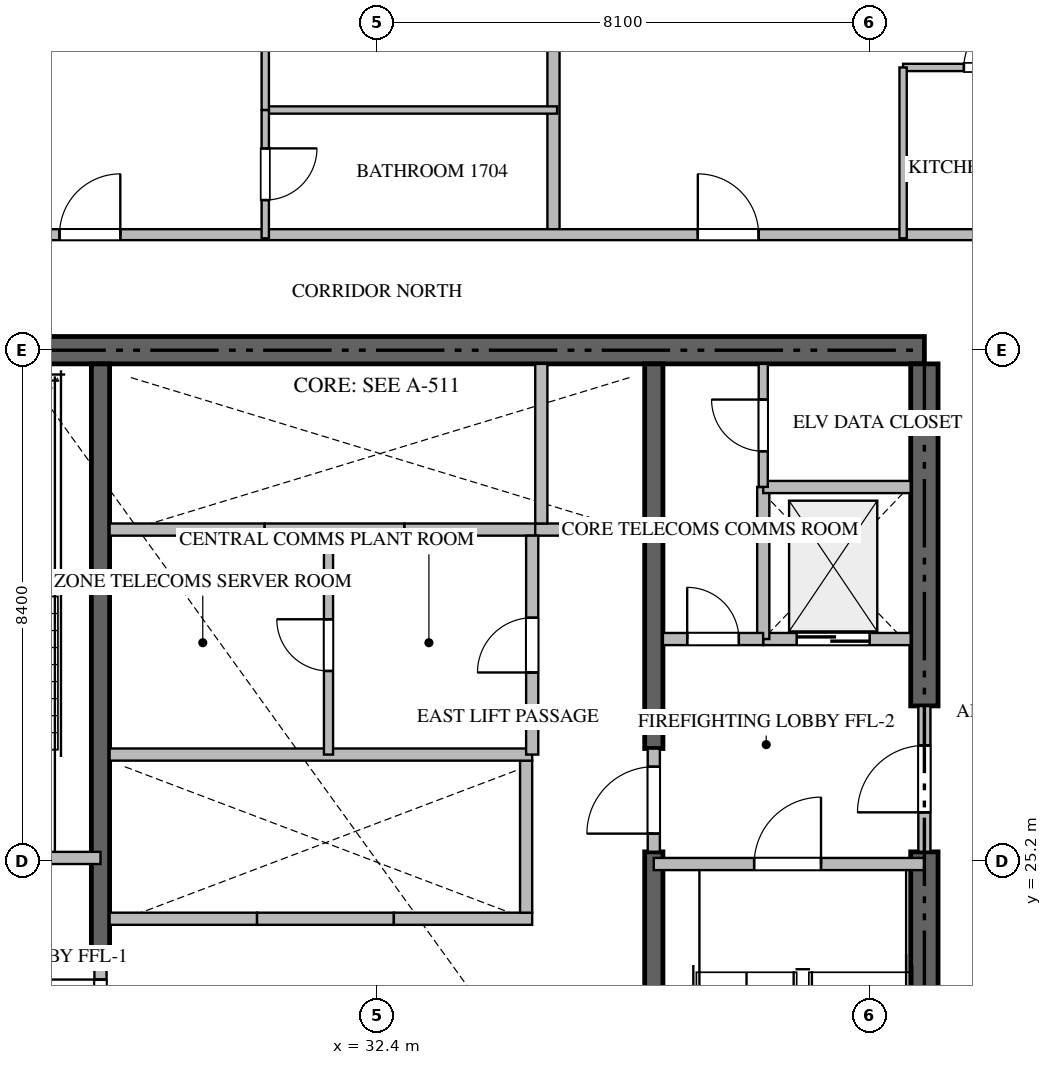
"""IFC4 building model, lengths in metres.
Left out: names, types, materials, properties, quantities, classifications, styles, units other than length and angle.
Written with IfcOpenShell. Run it as: python <this file> out.ifc"""

import sys

from ifc_helpers import new_model, si_unit, direction, frame, frame_2d, origin, place, context, subcontext, project, spatial, rectangle, extrude, source, transform, mapped, element, fill, save


model = new_model("IFC4")
c1 = context("Model", 3, precision=1e-05, world=origin(), true_north=direction((0.0, 1.0)))
c2 = subcontext(c1, "Body", "Model", "MODEL_VIEW")
j1 = project(units=[si_unit("LENGTHUNIT", "METRE"), si_unit("PLANEANGLEUNIT", "RADIAN")], contexts=[c1])
p1 = place(None, origin())
s1 = spatial("IfcSite", under=j1, at=p1, CompositionType="ELEMENT")
p2 = place(p1, origin())
s2 = spatial("IfcBuilding", under=s1, at=p2, CompositionType="ELEMENT")
p3 = place(p2, frame((0.0, 0.0, 71.7)))
s3 = spatial("IfcBuildingStorey", under=s2, at=p3, CompositionType="ELEMENT", Elevation=71.7)
p4 = place(p3, frame((41.4, 33.6, -0.26), z_axis=(0.0, 0.0, 1.0), x_axis=(-1.0, 0.0, 0.0)))
e1 = element("IfcWall", 1, at=p4, inside=s3, PredefinedType="SHEAR", context=c2, shape_type="SweptSolid", body=[
    extrude(rectangle(XDim=18.0, YDim=0.45, at=frame_2d((9.0, 0.0))), origin(), (0.0, 0.0, 1.0), 3.748),
])
p5 = place(p3, frame((41.4, 17.025, -0.26), z_axis=(0.0, 0.0, 1.0), x_axis=(0.0, 1.0, 0.0)))
e2 = element("IfcWall", 2, at=p5, inside=s3, PredefinedType="SHEAR", context=c2, shape_type="SweptSolid", body=[
    extrude(rectangle(XDim=8.325, YDim=0.45, at=frame_2d((4.163, 0.0))), origin(), (0.0, 0.0, 1.0), 3.748),
])
p6 = place(p3, frame((41.4, 27.75, -0.26), z_axis=(0.0, 0.0, 1.0), x_axis=(0.0, 1.0, 0.0)))
e3 = element("IfcWall", 3, at=p6, inside=s3, PredefinedType="SHEAR", context=c2, shape_type="SweptSolid", body=[
    extrude(rectangle(XDim=5.625, YDim=0.45, at=frame_2d((2.812, 0.0))), origin(), (0.0, 0.0, 1.0), 3.748),
])
p7 = place(p3, frame((27.85, 23.55, -0.26), z_axis=(0.0, 0.0, 1.0), x_axis=(0.0, 1.0, 0.0)))
e4 = element("IfcWall", 4, at=p7, inside=s3, PredefinedType="SHEAR", context=c2, shape_type="SweptSolid", body=[
    extrude(rectangle(XDim=9.825, YDim=0.3, at=frame_2d((4.913, 0.0))), origin(), (0.0, 0.0, 1.0), 3.748),
])
p8 = place(p3, frame((36.95, 17.025, -0.26), z_axis=(0.0, 0.0, 1.0), x_axis=(0.0, 1.0, 0.0)))
e5 = element("IfcWall", 5, at=p8, inside=s3, PredefinedType="SHEAR", context=c2, shape_type="SweptSolid", body=[
    extrude(rectangle(XDim=8.325, YDim=0.3, at=frame_2d((4.163, 0.0))), origin(), (0.0, 0.0, 1.0), 3.748),
])
p9 = place(p3, frame((36.95, 27.05, -0.26), z_axis=(0.0, 0.0, 1.0), x_axis=(0.0, 1.0, 0.0)))
e6 = element("IfcWall", 6, at=p9, inside=s3, PredefinedType="SHEAR", context=c2, shape_type="SweptSolid", body=[
    extrude(rectangle(XDim=6.325, YDim=0.3, at=frame_2d((3.163, 0.0))), origin(), (0.0, 0.0, 1.0), 3.748),
])
p10 = place(p3, frame((23.4, 25.25, 0.0), z_axis=(0.0, 0.0, 1.0), x_axis=(1.0, 0.0, 0.0)))
e7 = element("IfcWall", 7, at=p10, inside=s3, PredefinedType="STANDARD", context=c2, shape_type="SweptSolid", body=[
    extrude(rectangle(XDim=4.45, YDim=0.2, at=frame_2d((2.225, 0.0))), origin(), (0.0, 0.0, 1.0), 3.49),
])
p11 = place(p10, frame((1.65, 0.0, 0.0)))
e8 = element("IfcOpeningElement", 8, at=p11, cuts=e7, PredefinedType="OPENING", context=c2, shape_type="SweptSolid", body=[
    extrude(rectangle(XDim=1.1, YDim=2.15, at=frame_2d((0.55, 1.075))), frame((0.0, 0.11, 0.0), z_axis=(0.0, -1.0, 0.0), x_axis=(1.0, 0.0, 0.0)), (0.0, 0.0, 1.0), 0.22),
])
p12 = place(p3, frame((36.95, 25.15, 0.0), z_axis=(0.0, 0.0, 1.0), x_axis=(1.0, 0.0, 0.0)))
e9 = element("IfcWall", 9, at=p12, inside=s3, PredefinedType="STANDARD", context=c2, shape_type="SweptSolid", body=[
    extrude(rectangle(XDim=4.45, YDim=0.2, at=frame_2d((2.225, 0.0))), origin(), (0.0, 0.0, 1.0), 3.49),
])
p13 = place(p12, frame((1.65, 0.0, 0.0)))
e10 = element("IfcOpeningElement", 10, at=p13, cuts=e9, PredefinedType="OPENING", context=c2, shape_type="SweptSolid", body=[
    extrude(rectangle(XDim=1.1, YDim=2.15, at=frame_2d((0.55, 1.075))), frame((0.0, 0.11, 0.0), z_axis=(0.0, -1.0, 0.0), x_axis=(1.0, 0.0, 0.0)), (0.0, 0.0, 1.0), 0.22),
])
p14 = place(p3, frame((38.75, 28.85, 0.0), z_axis=(0.0, 0.0, 1.0), x_axis=(1.0, 0.0, 0.0)))
e11 = element("IfcWall", 11, at=p14, inside=s3, PredefinedType="STANDARD", context=c2, shape_type="SweptSolid", body=[
    extrude(rectangle(XDim=2.425, YDim=0.2, at=frame_2d((1.212, 0.0))), origin(), (0.0, 0.0, 1.0), 3.49),
])
p15 = place(p14, frame((0.55, 0.0, 0.0)))
e12 = element("IfcOpeningElement", 12, at=p15, cuts=e11, PredefinedType="OPENING", context=c2, shape_type="SweptSolid", body=[
    extrude(rectangle(XDim=1.2, YDim=2.2, at=frame_2d((0.6, 1.1))), frame((0.0, 0.11, 0.0), z_axis=(0.0, -1.0, 0.0), x_axis=(1.0, 0.0, 0.0)), (0.0, 0.0, 1.0), 0.22),
])
p16 = place(p3, frame((28.0, 24.25, 0.0), z_axis=(0.0, 0.0, 1.0), x_axis=(1.0, 0.0, 0.0)))
e13 = element("IfcWall", 13, at=p16, inside=s3, PredefinedType="STANDARD", context=c2, shape_type="SweptSolid", body=[
    extrude(rectangle(XDim=2.425, YDim=0.2, at=frame_2d((1.212, 0.0))), origin(), (0.0, 0.0, 1.0), 3.49),
])
p17 = place(p3, frame((30.425, 24.25, 0.0), z_axis=(0.0, 0.0, 1.0), x_axis=(1.0, 0.0, 0.0)))
e14 = element("IfcWall", 14, at=p17, inside=s3, PredefinedType="STANDARD", context=c2, shape_type="SweptSolid", body=[
    extrude(rectangle(XDim=2.25, YDim=0.2, at=frame_2d((1.125, 0.0))), origin(), (0.0, 0.0, 1.0), 3.49),
])
p18 = place(p3, frame((32.675, 24.25, 0.0), z_axis=(0.0, 0.0, 1.0), x_axis=(1.0, 0.0, 0.0)))
e15 = element("IfcWall", 15, at=p18, inside=s3, PredefinedType="STANDARD", context=c2, shape_type="SweptSolid", body=[
    extrude(rectangle(XDim=2.275, YDim=0.2, at=frame_2d((1.137, 0.0))), origin(), (0.0, 0.0, 1.0), 3.49),
])
p19 = place(p3, frame((34.85, 24.35, 0.0), z_axis=(0.0, 0.0, 1.0), x_axis=(0.0, 1.0, 0.0)))
e16 = element("IfcWall", 16, at=p19, inside=s3, PredefinedType="STANDARD", context=c2, shape_type="SweptSolid", body=[
    extrude(rectangle(XDim=2.5, YDim=0.2, at=frame_2d((1.25, 0.0))), origin(), (0.0, 0.0, 1.0), 3.49),
])
p20 = place(p3, frame((28.0, 30.65, 0.0), z_axis=(0.0, 0.0, 1.0), x_axis=(1.0, 0.0, 0.0)))
e17 = element("IfcWall", 17, at=p20, inside=s3, PredefinedType="STANDARD", context=c2, shape_type="SweptSolid", body=[
    extrude(rectangle(XDim=2.55, YDim=0.2, at=frame_2d((1.275, 0.0))), origin(), (0.0, 0.0, 1.0), 3.49),
])
p21 = place(p3, frame((30.55, 30.65, 0.0), z_axis=(0.0, 0.0, 1.0), x_axis=(1.0, 0.0, 0.0)))
e18 = element("IfcWall", 18, at=p21, inside=s3, PredefinedType="STANDARD", context=c2, shape_type="SweptSolid", body=[
    extrude(rectangle(XDim=2.3, YDim=0.2, at=frame_2d((1.15, 0.0))), origin(), (0.0, 0.0, 1.0), 3.49),
])
p22 = place(p3, frame((32.85, 30.65, 0.0), z_axis=(0.0, 0.0, 1.0), x_axis=(1.0, 0.0, 0.0)))
e19 = element("IfcWall", 19, at=p22, inside=s3, PredefinedType="STANDARD", context=c2, shape_type="SweptSolid", body=[
    extrude(rectangle(XDim=2.15, YDim=0.2, at=frame_2d((1.075, 0.0))), origin(), (0.0, 0.0, 1.0), 3.49),
])
p23 = place(p3, frame((35.0, 30.65, 0.0), z_axis=(0.0, 0.0, 1.0), x_axis=(1.0, 0.0, 0.0)))
e20 = element("IfcWall", 20, at=p23, inside=s3, PredefinedType="STANDARD", context=c2, shape_type="SweptSolid", body=[
    extrude(rectangle(XDim=1.8, YDim=0.2, at=frame_2d((0.9, 0.0))), origin(), (0.0, 0.0, 1.0), 3.49),
])
p24 = place(p3, frame((35.1, 30.75, 0.0), z_axis=(0.0, 0.0, 1.0), x_axis=(0.0, 1.0, 0.0)))
e21 = element("IfcWall", 21, at=p24, inside=s3, PredefinedType="STANDARD", context=c2, shape_type="SweptSolid", body=[
    extrude(rectangle(XDim=2.625, YDim=0.2, at=frame_2d((1.312, 0.0))), origin(), (0.0, 0.0, 1.0), 3.49),
])
p25 = place(p3, frame((38.75, 28.85, 0.0), z_axis=(0.0, 0.0, 1.0), x_axis=(0.0, 1.0, 0.0)))
e22 = element("IfcWall", 22, at=p25, inside=s3, PredefinedType="STANDARD", context=c2, shape_type="SweptSolid", body=[
    extrude(rectangle(XDim=2.5, YDim=0.2, at=frame_2d((1.25, 0.0))), origin(), (0.0, 0.0, 1.0), 3.49),
])
p26 = place(p3, frame((38.75, 31.35, 0.0), z_axis=(0.0, 0.0, 1.0), x_axis=(1.0, 0.0, 0.0)))
e23 = element("IfcWall", 23, at=p26, inside=s3, PredefinedType="STANDARD", context=c2, shape_type="SweptSolid", body=[
    extrude(rectangle(XDim=2.425, YDim=0.2, at=frame_2d((1.212, 0.0))), origin(), (0.0, 0.0, 1.0), 3.49),
])
p27 = place(p3, frame((37.1, 28.85, 0.0), z_axis=(0.0, 0.0, 1.0), x_axis=(1.0, 0.0, 0.0)))
e24 = element("IfcWall", 24, at=p27, inside=s3, PredefinedType="STANDARD", context=c2, shape_type="SweptSolid", body=[
    extrude(rectangle(XDim=1.648, YDim=0.2, at=frame_2d((0.824, 0.0))), origin(), (0.0, 0.0, 1.0), 3.49),
])
p28 = place(p27, frame((0.399, 0.0, 0.0)))
e25 = element("IfcOpeningElement", 25, at=p28, cuts=e24, PredefinedType="OPENING", context=c2, shape_type="SweptSolid", body=[
    extrude(rectangle(XDim=0.85, YDim=2.1, at=frame_2d((0.425, 1.05))), frame((0.0, 0.11, 0.0), z_axis=(0.0, -1.0, 0.0), x_axis=(1.0, 0.0, 0.0)), (0.0, 0.0, 1.0), 0.22),
])
p29 = place(p3, frame((41.4, 25.352, 0.0), z_axis=(0.0, 0.0, 1.0), x_axis=(0.0, 1.0, 0.0)))
e26 = element("IfcWall", 26, at=p29, inside=s3, PredefinedType="STANDARD", context=c2, shape_type="SweptSolid", body=[
    extrude(rectangle(XDim=2.396, YDim=0.2, at=frame_2d((1.198, 0.0))), origin(), (0.0, 0.0, 1.0), 3.49),
])
p30 = place(p29, frame((0.648, 0.0, 0.0)))
e27 = element("IfcOpeningElement", 27, at=p30, cuts=e26, PredefinedType="OPENING", context=c2, shape_type="SweptSolid", body=[
    extrude(rectangle(XDim=1.1, YDim=2.15, at=frame_2d((0.55, 1.075))), frame((0.0, 0.11, 0.0), z_axis=(0.0, -1.0, 0.0), x_axis=(1.0, 0.0, 0.0)), (0.0, 0.0, 1.0), 0.22),
])
p31 = place(p3, frame((27.85, 21.852, 0.0), z_axis=(0.0, 0.0, 1.0), x_axis=(0.0, 1.0, 0.0)))
e28 = element("IfcWall", 28, at=p31, inside=s3, PredefinedType="STANDARD", context=c2, shape_type="SweptSolid", body=[
    extrude(rectangle(XDim=1.696, YDim=0.2, at=frame_2d((0.848, 0.0))), origin(), (0.0, 0.0, 1.0), 3.49),
])
p32 = place(p31, frame((0.298, 0.0, 0.0)))
e29 = element("IfcOpeningElement", 29, at=p32, cuts=e28, PredefinedType="OPENING", context=c2, shape_type="SweptSolid", body=[
    extrude(rectangle(XDim=1.1, YDim=2.15, at=frame_2d((0.55, 1.075))), frame((0.0, 0.11, 0.0), z_axis=(0.0, -1.0, 0.0), x_axis=(1.0, 0.0, 0.0)), (0.0, 0.0, 1.0), 0.22),
])
p33 = place(p3, frame((36.95, 25.352, 0.0), z_axis=(0.0, 0.0, 1.0), x_axis=(0.0, 1.0, 0.0)))
e30 = element("IfcWall", 30, at=p33, inside=s3, PredefinedType="STANDARD", context=c2, shape_type="SweptSolid", body=[
    extrude(rectangle(XDim=1.696, YDim=0.2, at=frame_2d((0.848, 0.0))), origin(), (0.0, 0.0, 1.0), 3.49),
])
p34 = place(p33, frame((0.298, 0.0, 0.0)))
e31 = element("IfcOpeningElement", 31, at=p34, cuts=e30, PredefinedType="OPENING", context=c2, shape_type="SweptSolid", body=[
    extrude(rectangle(XDim=1.1, YDim=2.15, at=frame_2d((0.55, 1.075))), frame((0.0, 0.11, 0.0), z_axis=(0.0, -1.0, 0.0), x_axis=(1.0, 0.0, 0.0)), (0.0, 0.0, 1.0), 0.22),
])
p35 = place(p3, frame((28.0, 26.95, 0.0), z_axis=(0.0, 0.0, 1.0), x_axis=(1.0, 0.0, 0.0)))
e32 = element("IfcWall", 32, at=p35, inside=s3, PredefinedType="STANDARD", context=c2, shape_type="SweptSolid", body=[
    extrude(rectangle(XDim=6.95, YDim=0.2, at=frame_2d((3.475, 0.0))), origin(), (0.0, 0.0, 1.0), 3.49),
])
p36 = place(p3, frame((38.75, 31.352, 0.0), z_axis=(0.0, 0.0, 1.0), x_axis=(0.0, 1.0, 0.0)))
e33 = element("IfcWall", 33, at=p36, inside=s3, PredefinedType="PARTITIONING", context=c2, shape_type="SweptSolid", body=[
    extrude(rectangle(XDim=2.023, YDim=0.15, at=frame_2d((1.011, 0.0))), origin(), (0.0, 0.0, 1.0), 3.49),
])
p37 = place(p36, frame((0.586, 0.0, 0.0)))
e34 = element("IfcOpeningElement", 34, at=p37, cuts=e33, PredefinedType="OPENING", context=c2, shape_type="SweptSolid", body=[
    extrude(rectangle(XDim=0.85, YDim=2.1, at=frame_2d((0.425, 1.05))), frame((0.0, 0.085, 0.0), z_axis=(0.0, -1.0, 0.0), x_axis=(1.0, 0.0, 0.0)), (0.0, 0.0, 1.0), 0.17),
])
p38 = place(p3, frame((34.95, 26.95, 0.0), z_axis=(0.0, 0.0, 1.0), x_axis=(0.0, 1.0, 0.0)))
e35 = element("IfcWall", 35, at=p38, inside=s3, PredefinedType="STANDARD", context=c2, shape_type="SweptSolid", body=[
    extrude(rectangle(XDim=3.6, YDim=0.2, at=frame_2d((1.8, 0.0))), origin(), (0.0, 0.0, 1.0), 3.49),
])
p39 = place(p38, frame((1.35, 0.0, 0.0)))
e36 = element("IfcOpeningElement", 36, at=p39, cuts=e35, PredefinedType="OPENING", context=c2, shape_type="SweptSolid", body=[
    extrude(rectangle(XDim=0.9, YDim=2.1, at=frame_2d((0.45, 1.05))), frame((0.0, 0.11, 0.0), z_axis=(0.0, -1.0, 0.0), x_axis=(1.0, 0.0, 0.0)), (0.0, 0.0, 1.0), 0.22),
])
p40 = place(p3, frame((31.6, 26.95, 0.0), z_axis=(0.0, 0.0, 1.0), x_axis=(0.0, 1.0, 0.0)))
e37 = element("IfcWall", 37, at=p40, inside=s3, PredefinedType="PARTITIONING", context=c2, shape_type="SweptSolid", body=[
    extrude(rectangle(XDim=3.6, YDim=0.15, at=frame_2d((1.8, 0.0))), origin(), (0.0, 0.0, 1.0), 3.49),
])
p41 = place(p40, frame((1.375, 0.0, 0.0)))
e38 = element("IfcOpeningElement", 38, at=p41, cuts=e37, PredefinedType="OPENING", context=c2, shape_type="SweptSolid", body=[
    extrude(rectangle(XDim=0.85, YDim=2.1, at=frame_2d((0.425, 1.05))), frame((0.0, 0.085, 0.0), z_axis=(0.0, -1.0, 0.0), x_axis=(1.0, 0.0, 0.0)), (0.0, 0.0, 1.0), 0.17),
])
p42 = place(p3, frame((35.3, 35.5, 0.0), z_axis=(0.0, 0.0, 1.0), x_axis=(0.0, 1.0, 0.0)))
e39 = element("IfcWall", 39, at=p42, inside=s3, PredefinedType="PARTITIONING", context=c2, shape_type="SweptSolid", body=[
    extrude(rectangle(XDim=14.618, YDim=0.2, at=frame_2d((7.309, 0.0))), origin(), (0.0, 0.0, 1.0), 3.49),
])
p43 = place(p3, frame((21.402, 35.5, 0.0), z_axis=(0.0, 0.0, 1.0), x_axis=(1.0, 0.0, 0.0)))
e40 = element("IfcWall", 40, at=p43, inside=s3, PredefinedType="PARTITIONING", context=c2, shape_type="SweptSolid", body=[
    extrude(rectangle(XDim=21.996, YDim=0.18, at=frame_2d((10.998, 0.0))), origin(), (0.0, 0.0, 1.0), 3.49),
])
p44 = place(p43, frame((5.774, 0.0, 0.0)))
e41 = element("IfcOpeningElement", 41, at=p44, cuts=e40, PredefinedType="OPENING", context=c2, shape_type="SweptSolid", body=[
    extrude(rectangle(XDim=1.0, YDim=2.15, at=frame_2d((0.5, 1.075))), frame((0.0, 0.1, 0.0), z_axis=(0.0, -1.0, 0.0), x_axis=(1.0, 0.0, 0.0)), (0.0, 0.0, 1.0), 0.2),
])
p45 = place(p43, frame((16.272, 0.0, 0.0)))
e42 = element("IfcOpeningElement", 42, at=p45, cuts=e40, PredefinedType="OPENING", context=c2, shape_type="SweptSolid", body=[
    extrude(rectangle(XDim=1.0, YDim=2.15, at=frame_2d((0.5, 1.075))), frame((0.0, 0.1, 0.0), z_axis=(0.0, -1.0, 0.0), x_axis=(1.0, 0.0, 0.0)), (0.0, 0.0, 1.0), 0.2),
])
p46 = place(p3, frame((30.56, 37.55, 0.0), z_axis=(0.0, 0.0, 1.0), x_axis=(1.0, 0.0, 0.0)))
e43 = element("IfcWall", 43, at=p46, inside=s3, PredefinedType="PARTITIONING", context=c2, shape_type="SweptSolid", body=[
    extrude(rectangle(XDim=4.8, YDim=0.12, at=frame_2d((2.4, 0.0))), origin(), (0.0, 0.0, 1.0), 3.49),
])
p47 = place(p3, frame((30.56, 43.706, 0.0), z_axis=(0.0, 0.0, 1.0), x_axis=(0.0, -1.0, 0.0)))
e44 = element("IfcWall", 44, at=p47, inside=s3, PredefinedType="PARTITIONING", context=c2, shape_type="SweptSolid", body=[
    extrude(rectangle(XDim=6.156, YDim=0.12, at=frame_2d((3.078, 0.0))), origin(), (0.0, 0.0, 1.0), 3.49),
])
p48 = place(p47, frame((2.653, 0.0, 0.0)))
e45 = element("IfcOpeningElement", 45, at=p48, cuts=e44, PredefinedType="OPENING", context=c2, shape_type="SweptSolid", body=[
    extrude(rectangle(XDim=0.85, YDim=2.1, at=frame_2d((0.425, 1.05))), frame((0.0, 0.07, 0.0), z_axis=(0.0, -1.0, 0.0), x_axis=(1.0, 0.0, 0.0)), (0.0, 0.0, 1.0), 0.14),
])
p49 = place(p3, frame((30.56, 37.548, 0.0), z_axis=(0.0, 0.0, 1.0), x_axis=(0.0, -1.0, 0.0)))
e46 = element("IfcWall", 46, at=p49, inside=s3, PredefinedType="PARTITIONING", context=c2, shape_type="SweptSolid", body=[
    extrude(rectangle(XDim=2.108, YDim=0.12, at=frame_2d((1.054, 0.0))), origin(), (0.0, 0.0, 1.0), 3.49),
])
p50 = place(p49, frame((0.629, 0.0, 0.0)))
e47 = element("IfcOpeningElement", 47, at=p50, cuts=e46, PredefinedType="OPENING", context=c2, shape_type="SweptSolid", body=[
    extrude(rectangle(XDim=0.85, YDim=2.1, at=frame_2d((0.425, 1.05))), frame((0.0, 0.07, 0.0), z_axis=(0.0, -1.0, 0.0), x_axis=(1.0, 0.0, 0.0)), (0.0, 0.0, 1.0), 0.14),
])
p51 = place(p3, frame((41.05, 38.25, 0.0), z_axis=(0.0, 0.0, 1.0), x_axis=(1.0, 0.0, 0.0)))
e48 = element("IfcWall", 48, at=p51, inside=s3, PredefinedType="PARTITIONING", context=c2, shape_type="SweptSolid", body=[
    extrude(rectangle(XDim=2.85, YDim=0.12, at=frame_2d((1.425, 0.0))), origin(), (0.0, 0.0, 1.0), 3.49),
])
p52 = place(p51, frame((1.0, 0.0, 0.0)))
e49 = element("IfcOpeningElement", 49, at=p52, cuts=e48, PredefinedType="OPENING", context=c2, shape_type="SweptSolid", body=[
    extrude(rectangle(XDim=0.85, YDim=2.1, at=frame_2d((0.425, 1.05))), frame((0.0, 0.07, 0.0), z_axis=(0.0, -1.0, 0.0), x_axis=(1.0, 0.0, 0.0)), (0.0, 0.0, 1.0), 0.14),
])
p53 = place(p3, frame((41.05, 38.25, 0.0), z_axis=(0.0, 0.0, 1.0), x_axis=(0.0, -1.0, 0.0)))
e50 = element("IfcWall", 50, at=p53, inside=s3, PredefinedType="PARTITIONING", context=c2, shape_type="SweptSolid", body=[
    extrude(rectangle(XDim=2.81, YDim=0.12, at=frame_2d((1.405, 0.0))), origin(), (0.0, 0.0, 1.0), 3.49),
])
m1 = source(origin(), c2, "Body", "SweptSolid", [
    extrude(rectangle(XDim=1.1, YDim=2.15, at=frame_2d((0.55, 1.075))), frame((0.0, 0.025, 0.0), z_axis=(0.0, -1.0, 0.0), x_axis=(1.0, 0.0, 0.0)), (0.0, 0.0, 1.0), 0.05),
])
p54 = place(p13, origin())
e51 = element("IfcDoor", 51, at=p54, inside=s3, OperationType="SINGLE_SWING_RIGHT", PredefinedType="DOOR", context=c2, shape_type="MappedRepresentation", body=[
    mapped(m1, transform((0.0, 0.0, 0.0), scale=1.0)),
])
fill(e10, e51)
m2 = source(origin(), c2, "Body", "SweptSolid", [
    extrude(rectangle(XDim=1.2, YDim=2.2, at=frame_2d((0.6, 1.1))), frame((0.0, 0.025, 0.0), z_axis=(0.0, -1.0, 0.0), x_axis=(1.0, 0.0, 0.0)), (0.0, 0.0, 1.0), 0.05),
])
p55 = place(p15, origin())
e52 = element("IfcDoor", 52, at=p55, inside=s3, OperationType="DOUBLE_DOOR_SLIDING", PredefinedType="DOOR", context=c2, shape_type="MappedRepresentation", body=[
    mapped(m2, transform((0.0, 0.0, 0.0), scale=1.0)),
])
fill(e12, e52)
m3 = source(origin(), c2, "Body", "SweptSolid", [
    extrude(rectangle(XDim=0.85, YDim=2.1, at=frame_2d((0.425, 1.05))), frame((0.0, 0.025, 0.0), z_axis=(0.0, -1.0, 0.0), x_axis=(1.0, 0.0, 0.0)), (0.0, 0.0, 1.0), 0.05),
])
p56 = place(p28, origin())
e53 = element("IfcDoor", 53, at=p56, inside=s3, OperationType="SINGLE_SWING_LEFT", PredefinedType="DOOR", context=c2, shape_type="MappedRepresentation", body=[
    mapped(m3, transform((0.0, 0.0, 0.0), scale=1.0)),
])
fill(e25, e53)
p57 = place(p30, origin())
e54 = element("IfcDoor", 54, at=p57, inside=s3, OperationType="SINGLE_SWING_LEFT", PredefinedType="DOOR", context=c2, shape_type="MappedRepresentation", body=[
    mapped(m1, transform((0.0, 0.0, 0.0), scale=1.0)),
])
fill(e27, e54)
p58 = place(p32, origin())
e55 = element("IfcDoor", 55, at=p58, inside=s3, OperationType="SINGLE_SWING_RIGHT", PredefinedType="DOOR", context=c2, shape_type="MappedRepresentation", body=[
    mapped(m1, transform((0.0, 0.0, 0.0), scale=1.0)),
])
fill(e29, e55)
p59 = place(p34, origin())
e56 = element("IfcDoor", 56, at=p59, inside=s3, OperationType="SINGLE_SWING_LEFT", PredefinedType="DOOR", context=c2, shape_type="MappedRepresentation", body=[
    mapped(m1, transform((0.0, 0.0, 0.0), scale=1.0)),
])
fill(e31, e56)
p60 = place(p37, origin())
e57 = element("IfcDoor", 57, at=p60, inside=s3, OperationType="SINGLE_SWING_RIGHT", PredefinedType="DOOR", context=c2, shape_type="MappedRepresentation", body=[
    mapped(m3, transform((0.0, 0.0, 0.0), scale=1.0)),
])
fill(e34, e57)
m4 = source(origin(), c2, "Body", "SweptSolid", [
    extrude(rectangle(XDim=0.9, YDim=2.1, at=frame_2d((0.45, 1.05))), frame((0.0, 0.025, 0.0), z_axis=(0.0, -1.0, 0.0), x_axis=(1.0, 0.0, 0.0)), (0.0, 0.0, 1.0), 0.05),
])
p61 = place(p39, origin())
e58 = element("IfcDoor", 58, at=p61, inside=s3, OperationType="SINGLE_SWING_LEFT", PredefinedType="DOOR", context=c2, shape_type="MappedRepresentation", body=[
    mapped(m4, transform((0.0, 0.0, 0.0), scale=1.0)),
])
fill(e36, e58)
p62 = place(p41, origin())
e59 = element("IfcDoor", 59, at=p62, inside=s3, OperationType="SINGLE_SWING_RIGHT", PredefinedType="DOOR", context=c2, shape_type="MappedRepresentation", body=[
    mapped(m3, transform((0.0, 0.0, 0.0), scale=1.0)),
])
fill(e38, e59)
m5 = source(origin(), c2, "Body", "SweptSolid", [
    extrude(rectangle(XDim=1.0, YDim=2.15, at=frame_2d((0.5, 1.075))), frame((0.0, 0.025, 0.0), z_axis=(0.0, -1.0, 0.0), x_axis=(1.0, 0.0, 0.0)), (0.0, 0.0, 1.0), 0.05),
])
p63 = place(p44, origin())
e60 = element("IfcDoor", 60, at=p63, inside=s3, OperationType="SINGLE_SWING_RIGHT", PredefinedType="DOOR", context=c2, shape_type="MappedRepresentation", body=[
    mapped(m5, transform((0.0, 0.0, 0.0), scale=1.0)),
])
fill(e41, e60)
p64 = place(p45, origin())
e61 = element("IfcDoor", 61, at=p64, inside=s3, OperationType="SINGLE_SWING_LEFT", PredefinedType="DOOR", context=c2, shape_type="MappedRepresentation", body=[
    mapped(m5, transform((0.0, 0.0, 0.0), scale=1.0)),
])
fill(e42, e61)
p65 = place(p50, origin())
e62 = element("IfcDoor", 62, at=p65, inside=s3, OperationType="SINGLE_SWING_LEFT", PredefinedType="DOOR", context=c2, shape_type="MappedRepresentation", body=[
    mapped(m3, transform((0.0, 0.0, 0.0), scale=1.0)),
])
fill(e47, e62)
p66 = place(p52, origin())
e63 = element("IfcDoor", 63, at=p66, inside=s3, OperationType="SINGLE_SWING_RIGHT", PredefinedType="DOOR", context=c2, shape_type="MappedRepresentation", body=[
    mapped(m3, transform((0.0, 0.0, 0.0), scale=1.0)),
])
fill(e49, e63)
save(model, sys.argv[1])
